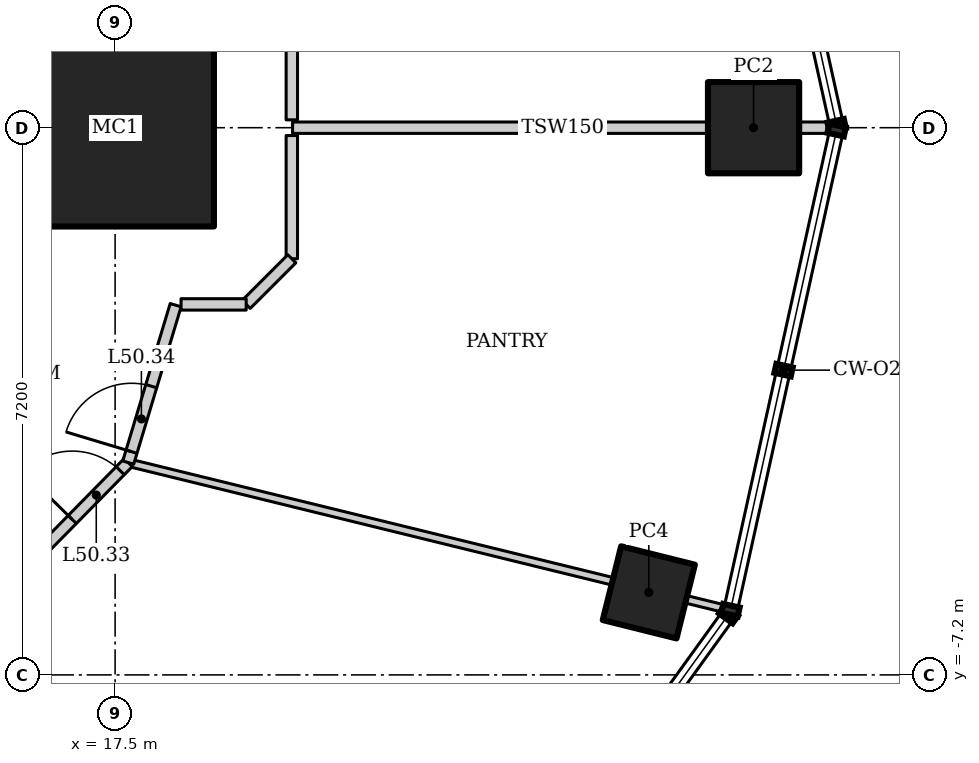
"""IFC4 building model, lengths in metres.
Left out: names, types, materials, properties, quantities, classifications, styles, units other than length and angle.
Written with IfcOpenShell. Run it as: python <this file> out.ifc"""

import sys

from ifc_helpers import new_model, si_unit, direction, frame, frame_2d, origin, origin_2d, place, context, subcontext, project, spatial, rectangle, hollow_rectangle, extrude, element, fill, save


model = new_model("IFC4")
c1 = context("Model", 3, precision=1e-05, world=origin(), true_north=direction((0.0, 1.0)))
c2 = subcontext(c1, "Body", "Model", "MODEL_VIEW")
j1 = project(units=[si_unit("LENGTHUNIT", "METRE"), si_unit("PLANEANGLEUNIT", "RADIAN")], contexts=[c1])
p1 = place(None, origin())
s1 = spatial("IfcSite", under=j1, at=p1, CompositionType="ELEMENT")
p2 = place(p1, origin())
s2 = spatial("IfcBuilding", under=s1, at=p2, CompositionType="ELEMENT")
p3 = place(p2, frame((0.0, 0.0, 215.8)))
s3 = spatial("IfcBuildingStorey", under=s2, at=p3, CompositionType="ELEMENT", Elevation=215.8)
p4 = place(p3, frame((17.5, 0.0, 0.0), z_axis=(0.0, 0.0, 1.0), x_axis=(1.0, 0.0, 0.0)))
e1 = element("IfcColumn", 1, at=p4, inside=s3, PredefinedType="COLUMN", context=c2, shape_type="SweptSolid", body=[
    extrude(hollow_rectangle(XDim=2.6, YDim=2.6, WallThickness=0.13, at=origin_2d()), origin(), (0.0, 0.0, 1.0), 4.2),
])
p5 = place(p3, frame((25.9, 0.0, 0.0), z_axis=(0.0, 0.0, 1.0), x_axis=(1.0, 0.0, 0.0)))
e2 = element("IfcColumn", 2, at=p5, inside=s3, PredefinedType="COLUMN", context=c2, shape_type="SweptSolid", body=[
    extrude(hollow_rectangle(XDim=1.2, YDim=1.2, WallThickness=0.1, at=origin_2d()), origin(), (0.0, 0.0, 1.0), 4.2),
])
p6 = place(p3, frame((24.522, -6.114, 0.0), z_axis=(0.0, 0.0, 1.0), x_axis=(0.2419218956, 0.970295726276, 0.0)))
e3 = element("IfcColumn", 3, at=p6, inside=s3, PredefinedType="COLUMN", context=c2, shape_type="SweptSolid", body=[
    extrude(hollow_rectangle(XDim=1.0, YDim=1.0, WallThickness=0.08, at=origin_2d()), origin(), (0.0, 0.0, 1.0), 4.2),
])
p7 = place(p3, frame((25.543, -6.336, 0.0), z_axis=(0.0, 0.0, 1.0), x_axis=(-0.97123661777, 0.238116425942, 0.0)))
e4 = element("IfcWall", 4, at=p7, inside=s3, PredefinedType="PARTITIONING", context=c2, shape_type="SweptSolid", body=[
    extrude(rectangle(XDim=8.103, YDim=0.1, at=frame_2d((4.052, 0.0))), origin(), (0.0, 0.0, 1.0), 3.108),
])
p8 = place(p3, frame((14.089, -8.051, 0.0), z_axis=(0.0, 0.0, 1.0), x_axis=(0.701111216625, 0.713051934941, 0.0)))
e5 = element("IfcWall", 5, at=p8, inside=s3, PredefinedType="PARTITIONING", context=c2, shape_type="SweptSolid", body=[
    extrude(rectangle(XDim=5.112, YDim=0.15, at=frame_2d((2.556, 0.0))), origin(), (0.0, 0.0, 1.0), 4.05),
])
p9 = place(p8, frame((4.061, 0.0, 0.0)))
e6 = element("IfcOpeningElement", 6, at=p9, cuts=e5, PredefinedType="OPENING", context=c2, shape_type="SweptSolid", body=[
    extrude(rectangle(XDim=0.9, YDim=2.1, at=frame_2d((0.45, 1.05))), frame((0.0, 0.085, 0.0), z_axis=(0.0, -1.0, 0.0), x_axis=(1.0, 0.0, 0.0)), (0.0, 0.0, 1.0), 0.17),
])
p10 = place(p3, frame((26.944, 0.0, 0.0), z_axis=(0.0, 0.0, 1.0), x_axis=(-1.0, 0.0, 0.0)))
e7 = element("IfcWall", 7, at=p10, inside=s3, PredefinedType="PARTITIONING", context=c2, shape_type="SweptSolid", body=[
    extrude(rectangle(XDim=7.109, YDim=0.15, at=frame_2d((3.555, 0.0))), origin(), (0.0, 0.0, 1.0), 3.349),
])
p11 = place(p3, frame((17.673, -4.406, 0.0), z_axis=(0.0, 0.0, 1.0), x_axis=(0.288362447016, 0.957521330912, 0.0)))
e8 = element("IfcWall", 8, at=p11, inside=s3, PredefinedType="PARTITIONING", context=c2, shape_type="SweptSolid", body=[
    extrude(rectangle(XDim=2.163, YDim=0.15, at=frame_2d((1.082, 0.0))), origin(), (0.0, 0.0, 1.0), 4.05),
])
p12 = place(p11, frame((0.15, 0.0, 0.0)))
e9 = element("IfcOpeningElement", 9, at=p12, cuts=e8, PredefinedType="OPENING", context=c2, shape_type="SweptSolid", body=[
    extrude(rectangle(XDim=0.9, YDim=2.1, at=frame_2d((0.45, 1.05))), frame((0.0, 0.085, 0.0), z_axis=(0.0, -1.0, 0.0), x_axis=(1.0, 0.0, 0.0)), (0.0, 0.0, 1.0), 0.17),
])
for number, where, z_axis, x_axis in (
    (10, (19.825, 1.725, 0.0), (0.0, 0.0, 1.0), (0.0, -1.0, 0.0)),
    (11, (19.825, -0.103, 0.0), (0.0, 0.0, 1.0), (0.0, -1.0, 0.0)),
):
    element("IfcWall", number, at=place(p3, frame(where, z_axis=z_axis, x_axis=x_axis)), inside=s3, PredefinedType="PARTITIONING", context=c2, shape_type="SweptSolid", body=[
        extrude(rectangle(XDim=1.621, YDim=0.15, at=frame_2d((0.811, 0.0))), origin(), (0.0, 0.0, 1.0), 4.05),
    ])
p13 = place(p3, frame((19.825, -1.725, 0.0), z_axis=(0.0, 0.0, 1.0), x_axis=(-0.707106781187, -0.707106781187, 0.0)))
e12 = element("IfcWall", 12, at=p13, inside=s3, PredefinedType="PARTITIONING", context=c2, shape_type="SweptSolid", body=[
    extrude(rectangle(XDim=0.849, YDim=0.15, at=frame_2d((0.425, 0.0))), origin(), (0.0, 0.0, 1.0), 4.05),
])
p14 = place(p3, frame((19.225, -2.325, 0.0), z_axis=(0.0, 0.0, 1.0), x_axis=(-1.0, 0.0, 0.0)))
e13 = element("IfcWall", 13, at=p14, inside=s3, PredefinedType="PARTITIONING", context=c2, shape_type="SweptSolid", body=[
    extrude(rectangle(XDim=0.857, YDim=0.15, at=frame_2d((0.429, 0.0))), origin(), (0.0, 0.0, 1.0), 4.05),
])
p15 = place(p9, origin())
e14 = element("IfcDoor", 14, at=p15, inside=s3, OperationType="SINGLE_SWING_LEFT", PredefinedType="DOOR", context=c2, shape_type="SweptSolid", body=[
    extrude(rectangle(XDim=0.9, YDim=2.1, at=frame_2d((0.45, 1.05))), frame((0.0, 0.025, 0.0), z_axis=(0.0, -1.0, 0.0), x_axis=(1.0, 0.0, 0.0)), (0.0, 0.0, 1.0), 0.05),
])
fill(e6, e14)
p16 = place(p12, origin())
e15 = element("IfcDoor", 15, at=p16, inside=s3, OperationType="SINGLE_SWING_LEFT", PredefinedType="DOOR", context=c2, shape_type="SweptSolid", body=[
    extrude(rectangle(XDim=0.9, YDim=2.1, at=frame_2d((0.45, 1.05))), frame((0.0, 0.025, 0.0), z_axis=(0.0, -1.0, 0.0), x_axis=(1.0, 0.0, 0.0)), (0.0, 0.0, 1.0), 0.05),
])
fill(e9, e15)
save(model, sys.argv[1])
